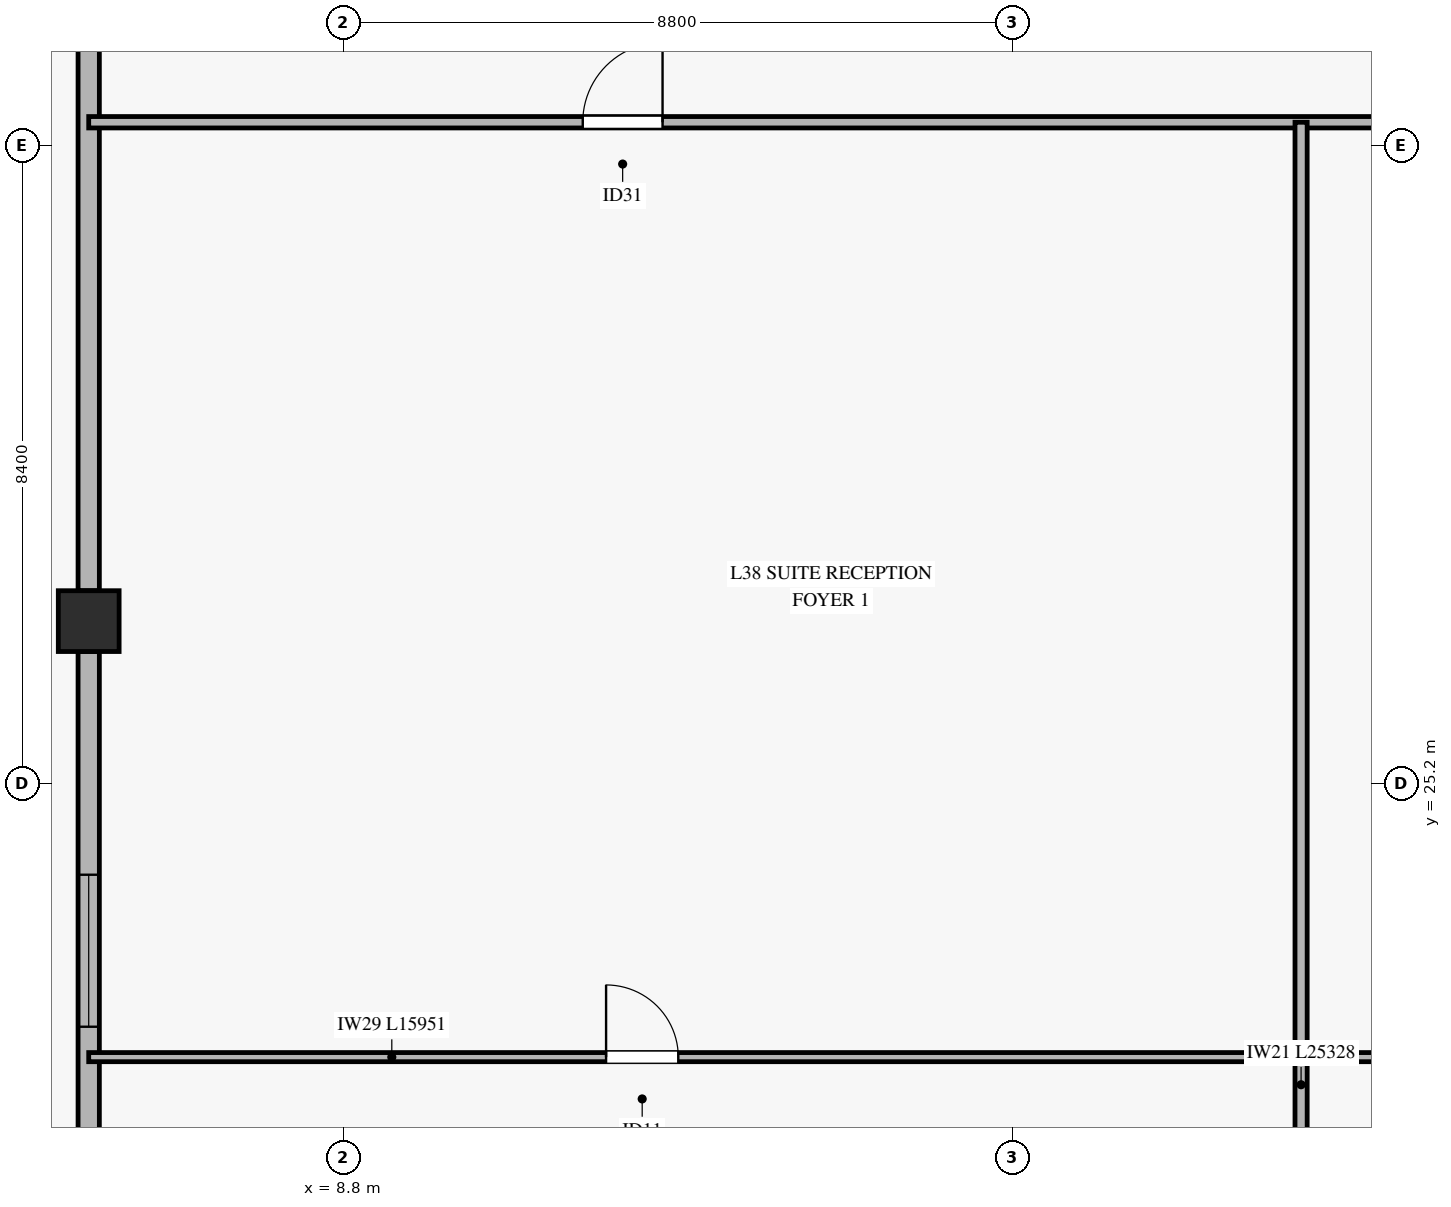
"""IFC4 building model, lengths in metres.
Left out: names, types, materials, properties, quantities, classifications, styles, units other than length and angle.
Written with IfcOpenShell. Run it as: python <this file> out.ifc"""

import sys

from ifc_helpers import new_model, si_unit, direction, frame, frame_2d, origin, origin_2d, place, context, subcontext, project, spatial, rectangle, hollow_rectangle, extrude, source, transform, mapped, element, fill, save


model = new_model("IFC4")
c1 = context("Model", 3, precision=1e-05, world=origin(), true_north=direction((0.0, 1.0)))
c2 = subcontext(c1, "Body", "Model", "MODEL_VIEW")
j1 = project(units=[si_unit("LENGTHUNIT", "METRE"), si_unit("PLANEANGLEUNIT", "RADIAN")], contexts=[c1])
p1 = place(None, origin())
s1 = spatial("IfcSite", under=j1, at=p1, CompositionType="ELEMENT")
p2 = place(p1, origin())
s2 = spatial("IfcBuilding", under=s1, at=p2, CompositionType="ELEMENT")
p3 = place(p2, frame((0.0, 0.0, 156.2)))
s3 = spatial("IfcBuildingStorey", under=s2, at=p3, CompositionType="ELEMENT", Elevation=156.2)
m1 = source(origin(), c2, "Body", "SweptSolid", [
    extrude(hollow_rectangle(XDim=0.8, YDim=0.8, WallThickness=0.036, at=origin_2d()), origin(), (0.0, 0.0, 1.0), 3.289),
])
p4 = place(p3, frame((5.449, 27.336, 0.0), z_axis=(0.071482791735, 0.080019158349, 0.994226908096), x_axis=(-0.745765790273, 0.666208215244, 0.0)))
e1 = element("IfcColumn", 1, at=p4, inside=s3, PredefinedType="COLUMN", context=c2, shape_type="MappedRepresentation", body=[
    mapped(m1, transform((0.0, 0.0, 0.0), x_axis=(1.0, 0.0, 0.0), y_axis=(0.0, 1.0, 0.0), z_axis=(0.0, 0.0, 1.0), scale=1.0)),
])
p5 = place(p3, frame((5.449, 11.511, 0.0), z_axis=(0.0, 0.0, 1.0), x_axis=(0.0, 1.0, 0.0)))
e2 = element("IfcWall", 2, at=p5, inside=s3, PredefinedType="SOLIDWALL", context=c2, shape_type="SweptSolid", body=[
    extrude(rectangle(XDim=15.425, YDim=0.28, at=frame_2d((7.712, 0.0))), origin(), (0.0, 0.0, 1.0), 2.75),
])
p6 = place(p5, frame((3.251, 0.0, 0.45)))
e3 = element("IfcOpeningElement", 3, at=p6, cuts=e2, PredefinedType="OPENING", context=c2, shape_type="SweptSolid", body=[
    extrude(rectangle(XDim=2.0, YDim=2.0, at=frame_2d((1.0, 1.0))), frame((0.0, 0.15, 0.0), z_axis=(0.0, -1.0, 0.0), x_axis=(1.0, 0.0, 0.0)), (0.0, 0.0, 1.0), 0.3),
])
p7 = place(p5, frame((10.488, 0.0, 0.45)))
e4 = element("IfcOpeningElement", 4, at=p7, cuts=e2, PredefinedType="OPENING", context=c2, shape_type="SweptSolid", body=[
    extrude(rectangle(XDim=2.0, YDim=2.0, at=frame_2d((1.0, 1.0))), frame((0.0, 0.15, 0.0), z_axis=(0.0, -1.0, 0.0), x_axis=(1.0, 0.0, 0.0)), (0.0, 0.0, 1.0), 0.3),
])
p8 = place(p3, frame((5.449, 27.736, 0.0), z_axis=(0.0, 0.0, 1.0), x_axis=(0.0, 1.0, 0.0)))
e5 = element("IfcWall", 5, at=p8, inside=s3, PredefinedType="SOLIDWALL", context=c2, shape_type="SweptSolid", body=[
    extrude(rectangle(XDim=15.425, YDim=0.28, at=frame_2d((7.712, 0.0))), origin(), (0.0, 0.0, 1.0), 2.75),
])
p9 = place(p8, frame((10.119, 0.0, 0.45)))
e6 = element("IfcOpeningElement", 6, at=p9, cuts=e5, PredefinedType="OPENING", context=c2, shape_type="SweptSolid", body=[
    extrude(rectangle(XDim=2.0, YDim=2.0, at=frame_2d((1.0, 1.0))), frame((0.0, 0.15, 0.0), z_axis=(0.0, -1.0, 0.0), x_axis=(1.0, 0.0, 0.0)), (0.0, 0.0, 1.0), 0.3),
])
p10 = place(p3, frame((5.449, 33.9, 0.0), z_axis=(0.0, 0.0, 1.0), x_axis=(1.0, 0.0, 0.0)))
e7 = element("IfcWall", 7, at=p10, inside=s3, PredefinedType="PARTITIONING", context=c2, shape_type="SweptSolid", body=[
    extrude(rectangle(XDim=59.502, YDim=0.15, at=frame_2d((29.751, 0.0))), origin(), (0.0, 0.0, 1.0), 2.455),
])
p11 = place(p10, frame((6.5, 0.0, 0.0)))
e8 = element("IfcOpeningElement", 8, at=p11, cuts=e7, PredefinedType="OPENING", context=c2, shape_type="SweptSolid", body=[
    extrude(rectangle(XDim=1.05, YDim=2.15, at=frame_2d((0.525, 1.075))), frame((0.0, 0.085, 0.0), z_axis=(0.0, -1.0, 0.0), x_axis=(1.0, 0.0, 0.0)), (0.0, 0.0, 1.0), 0.17),
])
p12 = place(p10, frame((18.704, 0.0, 0.0)))
e9 = element("IfcOpeningElement", 9, at=p12, cuts=e7, PredefinedType="OPENING", context=c2, shape_type="SweptSolid", body=[
    extrude(rectangle(XDim=1.05, YDim=2.15, at=frame_2d((0.525, 1.075))), frame((0.0, 0.085, 0.0), z_axis=(0.0, -1.0, 0.0), x_axis=(1.0, 0.0, 0.0)), (0.0, 0.0, 1.0), 0.17),
])
p13 = place(p10, frame((24.896, 0.0, 0.0)))
e10 = element("IfcOpeningElement", 10, at=p13, cuts=e7, PredefinedType="OPENING", context=c2, shape_type="SweptSolid", body=[
    extrude(rectangle(XDim=1.05, YDim=2.15, at=frame_2d((0.525, 1.075))), frame((0.0, 0.085, 0.0), z_axis=(0.0, -1.0, 0.0), x_axis=(1.0, 0.0, 0.0)), (0.0, 0.0, 1.0), 0.17),
])
p14 = place(p10, frame((30.387, 0.0, 0.0)))
e11 = element("IfcOpeningElement", 11, at=p14, cuts=e7, PredefinedType="OPENING", context=c2, shape_type="SweptSolid", body=[
    extrude(rectangle(XDim=1.05, YDim=2.15, at=frame_2d((0.525, 1.075))), frame((0.0, 0.085, 0.0), z_axis=(0.0, -1.0, 0.0), x_axis=(1.0, 0.0, 0.0)), (0.0, 0.0, 1.0), 0.17),
])
p15 = place(p10, frame((35.587, 0.0, 0.0)))
e12 = element("IfcOpeningElement", 12, at=p15, cuts=e7, PredefinedType="OPENING", context=c2, shape_type="SweptSolid", body=[
    extrude(rectangle(XDim=1.05, YDim=2.15, at=frame_2d((0.525, 1.075))), frame((0.0, 0.085, 0.0), z_axis=(0.0, -1.0, 0.0), x_axis=(1.0, 0.0, 0.0)), (0.0, 0.0, 1.0), 0.17),
])
p16 = place(p10, frame((46.392, 0.0, 0.0)))
e13 = element("IfcOpeningElement", 13, at=p16, cuts=e7, PredefinedType="OPENING", context=c2, shape_type="SweptSolid", body=[
    extrude(rectangle(XDim=1.05, YDim=2.15, at=frame_2d((0.525, 1.075))), frame((0.0, 0.085, 0.0), z_axis=(0.0, -1.0, 0.0), x_axis=(1.0, 0.0, 0.0)), (0.0, 0.0, 1.0), 0.17),
])
p17 = place(p3, frame((5.449, 21.599, 0.0), z_axis=(0.0, 0.0, 1.0), x_axis=(1.0, 0.0, 0.0)))
e14 = element("IfcWall", 14, at=p17, inside=s3, PredefinedType="PARTITIONING", context=c2, shape_type="SweptSolid", body=[
    extrude(rectangle(XDim=15.951, YDim=0.12, at=frame_2d((7.976, 0.0))), origin(), (0.0, 0.0, 1.0), 2.455),
])
p18 = place(p17, frame((6.807, 0.0, 0.0)))
e15 = element("IfcOpeningElement", 15, at=p18, cuts=e14, PredefinedType="OPENING", context=c2, shape_type="SweptSolid", body=[
    extrude(rectangle(XDim=0.95, YDim=2.1, at=frame_2d((0.475, 1.05))), frame((0.0, 0.07, 0.0), z_axis=(0.0, -1.0, 0.0), x_axis=(1.0, 0.0, 0.0)), (0.0, 0.0, 1.0), 0.14),
])
p19 = place(p3, frame((21.4, 8.572, 0.0), z_axis=(0.0, 0.0, 1.0), x_axis=(0.0, 1.0, 0.0)))
e16 = element("IfcWall", 16, at=p19, inside=s3, PredefinedType="PARTITIONING", context=c2, shape_type="SweptSolid", body=[
    extrude(rectangle(XDim=25.328, YDim=0.16, at=frame_2d((12.664, 0.0))), origin(), (0.0, 0.0, 1.0), 2.755),
])
p20 = place(p3, frame((21.4, 21.599, 0.0), z_axis=(0.0, 0.0, 1.0), x_axis=(1.0, 0.0, 0.0)))
e17 = element("IfcWall", 17, at=p20, inside=s3, PredefinedType="PARTITIONING", context=c2, shape_type="SweptSolid", body=[
    extrude(rectangle(XDim=6.8, YDim=0.12, at=frame_2d((3.4, 0.0))), origin(), (0.0, 0.0, 1.0), 3.27),
])
p21 = place(p20, frame((2.886, 0.0, 0.0)))
e18 = element("IfcOpeningElement", 18, at=p21, cuts=e17, PredefinedType="OPENING", context=c2, shape_type="SweptSolid", body=[
    extrude(rectangle(XDim=0.95, YDim=2.1, at=frame_2d((0.475, 1.05))), frame((0.0, 0.07, 0.0), z_axis=(0.0, -1.0, 0.0), x_axis=(1.0, 0.0, 0.0)), (0.0, 0.0, 1.0), 0.14),
])
m2 = source(origin(), c2, "Body", "SweptSolid", [
    extrude(rectangle(XDim=2.0, YDim=2.0, at=frame_2d((1.0, 1.0))), frame((0.0, 0.03, 0.0), z_axis=(0.0, -1.0, 0.0), x_axis=(1.0, 0.0, 0.0)), (0.0, 0.0, 1.0), 0.06),
])
p22 = place(p7, origin())
e19 = element("IfcWindow", 19, at=p22, inside=s3, PartitioningType="SINGLE_PANEL", PredefinedType="WINDOW", context=c2, shape_type="MappedRepresentation", body=[
    mapped(m2, transform((0.0, 0.0, 0.0), x_axis=(1.0, 0.0, 0.0), y_axis=(0.0, 1.0, 0.0), z_axis=(0.0, 0.0, 1.0), scale=1.0)),
])
fill(e4, e19)
m3 = source(origin(), c2, "Body", "SweptSolid", [
    extrude(rectangle(XDim=1.05, YDim=2.15, at=frame_2d((0.525, 1.075))), frame((0.0, 0.025, 0.0), z_axis=(0.0, -1.0, 0.0), x_axis=(1.0, 0.0, 0.0)), (0.0, 0.0, 1.0), 0.05),
])
p23 = place(p11, origin())
e20 = element("IfcDoor", 20, at=p23, inside=s3, OperationType="SINGLE_SWING_RIGHT", PredefinedType="DOOR", context=c2, shape_type="MappedRepresentation", body=[
    mapped(m3, transform((0.0, 0.0, 0.0), x_axis=(1.0, 0.0, 0.0), y_axis=(0.0, 1.0, 0.0), z_axis=(0.0, 0.0, 1.0), scale=1.0)),
])
fill(e8, e20)
m4 = source(origin(), c2, "Body", "SweptSolid", [
    extrude(rectangle(XDim=0.95, YDim=2.1, at=frame_2d((0.475, 1.05))), frame((0.0, 0.025, 0.0), z_axis=(0.0, -1.0, 0.0), x_axis=(1.0, 0.0, 0.0)), (0.0, 0.0, 1.0), 0.05),
])
p24 = place(p18, origin())
e21 = element("IfcDoor", 21, at=p24, inside=s3, OperationType="SINGLE_SWING_LEFT", PredefinedType="DOOR", context=c2, shape_type="MappedRepresentation", body=[
    mapped(m4, transform((0.0, 0.0, 0.0), x_axis=(1.0, 0.0, 0.0), y_axis=(0.0, 1.0, 0.0), z_axis=(0.0, 0.0, 1.0), scale=1.0)),
])
fill(e15, e21)
save(model, sys.argv[1])
